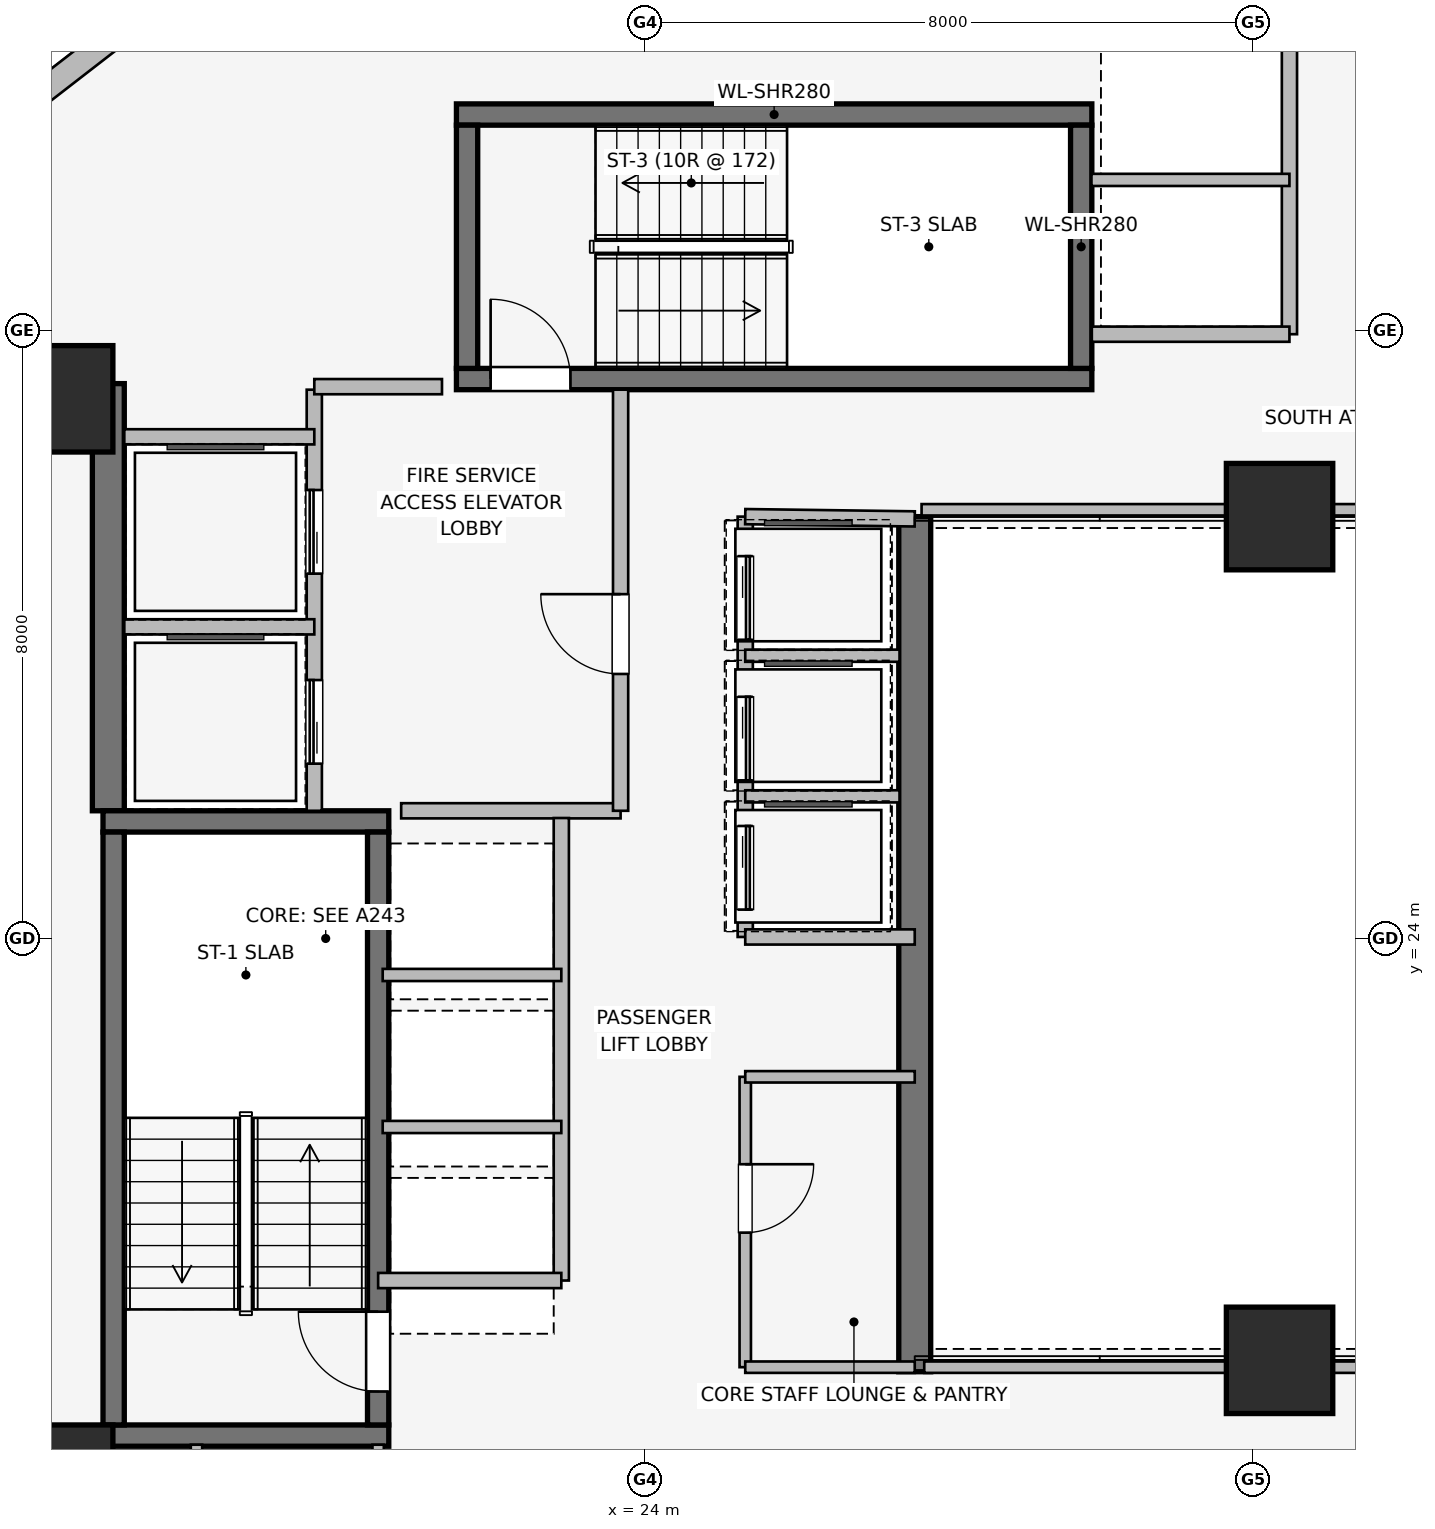
"""IFC4 building model, lengths in metres.
Left out: names, types, materials, properties, quantities, classifications, styles, units other than length and angle.
Written with IfcOpenShell. Run it as: python <this file> out.ifc"""

import sys

from ifc_helpers import new_model, si_unit, direction, frame, frame_2d, origin, origin_2d, place, context, subcontext, project, spatial, rectangle, extrude, element, fill, save


model = new_model("IFC4")
c1 = context("Model", 3, precision=1e-05, world=origin(), true_north=direction((0.0, 1.0)))
c2 = subcontext(c1, "Body", "Model", "MODEL_VIEW")
j1 = project(units=[si_unit("LENGTHUNIT", "METRE"), si_unit("PLANEANGLEUNIT", "RADIAN")], contexts=[c1])
p1 = place(None, origin())
s1 = spatial("IfcSite", under=j1, at=p1, CompositionType="ELEMENT")
p2 = place(p1, origin())
s2 = spatial("IfcBuilding", under=s1, at=p2, CompositionType="ELEMENT")
p3 = place(p2, frame((0.0, 0.0, 153.3)))
s3 = spatial("IfcBuildingStorey", under=s2, at=p3, CompositionType="ELEMENT", Elevation=153.3)
p4 = place(p3, frame((16.94, 25.68, 0.0), z_axis=(0.0, 0.0, 1.0), x_axis=(0.0, 1.0, 0.0)))
e1 = element("IfcWall", 1, at=p4, inside=s3, PredefinedType="SHEAR", context=c2, shape_type="SweptSolid", body=[
    extrude(rectangle(XDim=5.62, YDim=0.42, at=frame_2d((2.81, 0.0))), origin(), (0.0, 0.0, 1.0), 3.45),
])
p5 = place(p3, frame((27.55, 29.55, 0.0), z_axis=(0.0, 0.0, 1.0), x_axis=(0.0, -1.0, 0.0)))
e2 = element("IfcWall", 2, at=p5, inside=s3, PredefinedType="SHEAR", context=c2, shape_type="SweptSolid", body=[
    extrude(rectangle(XDim=11.25, YDim=0.42, at=frame_2d((5.625, 0.0))), origin(), (0.0, 0.0, 1.0), 3.45),
])
for number, where, z_axis, x_axis in (
    (3, (16.87, 17.46, 0.0), (0.0, 0.0, 1.0), (1.0, 0.0, 0.0)),
    (4, (20.63, 25.54, 0.0), (0.0, 0.0, 1.0), (-1.0, 0.0, 0.0)),
):
    element("IfcWall", number, at=place(p3, frame(where, z_axis=z_axis, x_axis=x_axis)), inside=s3, PredefinedType="SHEAR", context=c2, shape_type="SweptSolid", body=[
        extrude(rectangle(XDim=3.76, YDim=0.28, at=frame_2d((1.88, 0.0))), origin(), (0.0, 0.0, 1.0), 3.45),
    ])
p6 = place(p3, frame((17.01, 25.4, 0.0), z_axis=(0.0, 0.0, 1.0), x_axis=(0.0, -1.0, 0.0)))
e5 = element("IfcWall", 5, at=p6, inside=s3, PredefinedType="SHEAR", context=c2, shape_type="SweptSolid", body=[
    extrude(rectangle(XDim=7.8, YDim=0.28, at=frame_2d((3.9, 0.0))), origin(), (0.0, 0.0, 1.0), 3.45),
])
p7 = place(p3, frame((20.49, 17.6, 0.0), z_axis=(0.0, 0.0, 1.0), x_axis=(0.0, 1.0, 0.0)))
e6 = element("IfcWall", 6, at=p7, inside=s3, PredefinedType="SHEAR", context=c2, shape_type="SweptSolid", body=[
    extrude(rectangle(XDim=7.8, YDim=0.28, at=frame_2d((3.9, 0.0))), origin(), (0.0, 0.0, 1.0), 3.45),
])
p8 = place(p7, frame((0.44, 0.0, 0.0)))
e7 = element("IfcOpeningElement", 7, at=p8, cuts=e6, PredefinedType="OPENING", context=c2, shape_type="SweptSolid", body=[
    extrude(rectangle(XDim=1.05, YDim=2.0, at=frame_2d((0.525, 1.0))), frame((0.0, 0.15, 0.0), z_axis=(0.0, -1.0, 0.0), x_axis=(1.0, 0.0, 0.0)), (0.0, 0.0, 1.0), 0.3),
])
p9 = place(p3, frame((21.52, 31.36, 0.0), z_axis=(0.0, 0.0, 1.0), x_axis=(1.0, 0.0, 0.0)))
e8 = element("IfcWall", 8, at=p9, inside=s3, PredefinedType="SHEAR", context=c2, shape_type="SweptSolid", body=[
    extrude(rectangle(XDim=8.36, YDim=0.28, at=frame_2d((4.18, 0.0))), origin(), (0.0, 0.0, 1.0), 3.45),
])
p10 = place(p9, frame((0.45, 0.0, 0.0)))
e9 = element("IfcOpeningElement", 9, at=p10, cuts=e8, PredefinedType="OPENING", context=c2, shape_type="SweptSolid", body=[
    extrude(rectangle(XDim=1.05, YDim=2.0, at=frame_2d((0.525, 1.0))), frame((0.0, 0.15, 0.0), z_axis=(0.0, -1.0, 0.0), x_axis=(1.0, 0.0, 0.0)), (0.0, 0.0, 1.0), 0.3),
])
p11 = place(p3, frame((29.88, 34.84, 0.0), z_axis=(0.0, 0.0, 1.0), x_axis=(-1.0, 0.0, 0.0)))
e10 = element("IfcWall", 10, at=p11, inside=s3, PredefinedType="SHEAR", context=c2, shape_type="SweptSolid", body=[
    extrude(rectangle(XDim=8.36, YDim=0.28, at=frame_2d((4.18, 0.0))), origin(), (0.0, 0.0, 1.0), 3.45),
])
for number, where, z_axis, x_axis in (
    (11, (21.66, 34.7, 0.0), (0.0, 0.0, 1.0), (0.0, -1.0, 0.0)),
    (12, (29.74, 31.5, 0.0), (0.0, 0.0, 1.0), (0.0, 1.0, 0.0)),
):
    element("IfcWall", number, at=place(p3, frame(where, z_axis=z_axis, x_axis=x_axis)), inside=s3, PredefinedType="SHEAR", context=c2, shape_type="SweptSolid", body=[
        extrude(rectangle(XDim=3.2, YDim=0.28, at=frame_2d((1.6, 0.0))), origin(), (0.0, 0.0, 1.0), 3.45),
    ])
for number, where, z_axis, x_axis in (
    (13, (16.3, 16.9, 0.0), (0.0, 0.0, 1.0), (1.0, 0.0, 0.0)),
    (14, (16.3, 31.1, 0.0), (0.0, 0.0, 1.0), (1.0, 0.0, 0.0)),
    (15, (32.35, 18.45, 0.0), (0.0, 0.0, 1.0), (1.0, 0.0, 0.0)),
    (16, (32.35, 29.55, 0.0), (0.0, 0.0, 1.0), (1.0, 0.0, 0.0)),
):
    element("IfcColumn", number, at=place(p3, frame(where, z_axis=z_axis, x_axis=x_axis)), inside=s3, PredefinedType="COLUMN", context=c2, shape_type="SweptSolid", body=[
        extrude(rectangle(XDim=1.4, YDim=1.4, at=origin_2d()), origin(), (0.0, 0.0, 1.0), 3.45),
    ])
p12 = place(p3, frame((15.918, 35.024, 0.0), z_axis=(0.0, 0.0, 1.0), x_axis=(0.790621329885, 0.612305408053, 0.0)))
e17 = element("IfcWall", 17, at=p12, inside=s3, PredefinedType="STANDARD", context=c2, shape_type="SweptSolid", body=[
    extrude(rectangle(XDim=1.676, YDim=0.33, at=frame_2d((0.838, 0.0))), origin(), (0.0, 0.0, 1.0), 3.19),
])
p13 = place(p3, frame((19.65, 25.68, 0.0), z_axis=(0.0, 0.0, 1.0), x_axis=(0.0, 1.0, 0.0)))
e18 = element("IfcWall", 18, at=p13, inside=s3, PredefinedType="PARTITIONING", context=c2, shape_type="SweptSolid", body=[
    extrude(rectangle(XDim=5.54, YDim=0.2, at=frame_2d((2.77, 0.0))), origin(), (0.0, 0.0, 1.0), 3.19),
])
p14 = place(p13, frame((0.62, 0.0, 0.0)))
e19 = element("IfcOpeningElement", 19, at=p14, cuts=e18, PredefinedType="OPENING", context=c2, shape_type="SweptSolid", body=[
    extrude(rectangle(XDim=1.1, YDim=2.2, at=frame_2d((0.55, 1.1))), frame((0.0, 0.11, 0.0), z_axis=(0.0, -1.0, 0.0), x_axis=(1.0, 0.0, 0.0)), (0.0, 0.0, 1.0), 0.22),
])
p15 = place(p13, frame((3.12, 0.0, 0.0)))
e20 = element("IfcOpeningElement", 20, at=p15, cuts=e18, PredefinedType="OPENING", context=c2, shape_type="SweptSolid", body=[
    extrude(rectangle(XDim=1.1, YDim=2.2, at=frame_2d((0.55, 1.1))), frame((0.0, 0.11, 0.0), z_axis=(0.0, -1.0, 0.0), x_axis=(1.0, 0.0, 0.0)), (0.0, 0.0, 1.0), 0.22),
])
p16 = place(p3, frame((20.793, 25.68, 0.0), z_axis=(0.0, 0.0, 1.0), x_axis=(1.0, 0.0, 0.0)))
e21 = element("IfcWall", 21, at=p16, inside=s3, PredefinedType="PARTITIONING", context=c2, shape_type="SweptSolid", body=[
    extrude(rectangle(XDim=2.887, YDim=0.2, at=frame_2d((1.443, 0.0))), origin(), (0.0, 0.0, 1.0), 3.19),
])
p17 = place(p3, frame((23.68, 25.68, 0.0), z_axis=(0.0, 0.0, 1.0), x_axis=(0.0, 1.0, 0.0)))
e22 = element("IfcWall", 22, at=p17, inside=s3, PredefinedType="PARTITIONING", context=c2, shape_type="SweptSolid", body=[
    extrude(rectangle(XDim=5.54, YDim=0.2, at=frame_2d((2.77, 0.0))), origin(), (0.0, 0.0, 1.0), 3.19),
])
p18 = place(p17, frame((1.8, 0.0, 0.0)))
e23 = element("IfcOpeningElement", 23, at=p18, cuts=e22, PredefinedType="OPENING", context=c2, shape_type="SweptSolid", body=[
    extrude(rectangle(XDim=1.05, YDim=2.0, at=frame_2d((0.525, 1.0))), frame((0.0, 0.11, 0.0), z_axis=(0.0, -1.0, 0.0), x_axis=(1.0, 0.0, 0.0)), (0.0, 0.0, 1.0), 0.22),
])
p19 = place(p3, frame((21.33, 31.26, 0.0), z_axis=(0.0, 0.0, 1.0), x_axis=(-1.0, 0.0, 0.0)))
e24 = element("IfcWall", 24, at=p19, inside=s3, PredefinedType="PARTITIONING", context=c2, shape_type="SweptSolid", body=[
    extrude(rectangle(XDim=1.68, YDim=0.2, at=frame_2d((0.84, 0.0))), origin(), (0.0, 0.0, 1.0), 3.19),
])
p20 = place(p3, frame((17.15, 28.1, 0.0), z_axis=(0.0, 0.0, 1.0), x_axis=(1.0, 0.0, 0.0)))
e25 = element("IfcWall", 25, at=p20, inside=s3, PredefinedType="PARTITIONING", context=c2, shape_type="SweptSolid", body=[
    extrude(rectangle(XDim=2.5, YDim=0.2, at=frame_2d((1.25, 0.0))), origin(), (0.0, 0.0, 1.0), 3.19),
])
p21 = place(p3, frame((19.65, 30.6, 0.0), z_axis=(0.0, 0.0, 1.0), x_axis=(-1.0, 0.0, 0.0)))
e26 = element("IfcWall", 26, at=p21, inside=s3, PredefinedType="PARTITIONING", context=c2, shape_type="SweptSolid", body=[
    extrude(rectangle(XDim=2.5, YDim=0.2, at=frame_2d((1.25, 0.0))), origin(), (0.0, 0.0, 1.0), 2.09),
])
p22 = place(p3, frame((32.48, 31.95, 0.0), z_axis=(0.0, 0.0, 1.0), x_axis=(0.0, 1.0, 0.0)))
e27 = element("IfcWall", 27, at=p22, inside=s3, PredefinedType="PARTITIONING", context=c2, shape_type="SweptSolid", body=[
    extrude(rectangle(XDim=4.05, YDim=0.2, at=frame_2d((2.025, 0.0))), origin(), (0.0, 0.0, 1.0), 3.19),
])
p23 = place(p3, frame((32.48, 31.95, 0.0), z_axis=(0.0, 0.0, 1.0), x_axis=(-1.0, 0.0, 0.0)))
e28 = element("IfcWall", 28, at=p23, inside=s3, PredefinedType="PARTITIONING", context=c2, shape_type="SweptSolid", body=[
    extrude(rectangle(XDim=2.6, YDim=0.2, at=frame_2d((1.3, 0.0))), origin(), (0.0, 0.0, 1.0), 3.19),
])
p24 = place(p3, frame((29.875, 33.98, 0.0), z_axis=(0.0, 0.0, 1.0), x_axis=(1.0, 0.0, 0.0)))
e29 = element("IfcWall", 29, at=p24, inside=s3, PredefinedType="PARTITIONING", context=c2, shape_type="SweptSolid", body=[
    extrude(rectangle(XDim=2.605, YDim=0.16, at=frame_2d((1.302, 0.0))), origin(), (0.0, 0.0, 1.0), 3.19),
])
p25 = place(p3, frame((22.9, 19.5, 0.0), z_axis=(0.0, 0.0, 1.0), x_axis=(0.0, 1.0, 0.0)))
e30 = element("IfcWall", 30, at=p25, inside=s3, PredefinedType="PARTITIONING", context=c2, shape_type="SweptSolid", body=[
    extrude(rectangle(XDim=6.085, YDim=0.2, at=frame_2d((3.042, 0.0))), origin(), (0.0, 0.0, 1.0), 3.19),
])
p26 = place(p3, frame((20.49, 19.5, 0.0), z_axis=(0.0, 0.0, 1.0), x_axis=(1.0, 0.0, 0.0)))
e31 = element("IfcWall", 31, at=p26, inside=s3, PredefinedType="PARTITIONING", context=c2, shape_type="SweptSolid", body=[
    extrude(rectangle(XDim=2.41, YDim=0.2, at=frame_2d((1.205, 0.0))), origin(), (0.0, 0.0, 1.0), 2.09),
])
for number, where, z_axis, x_axis in (
    (32, (20.55, 21.52, 0.0), (0.0, 0.0, 1.0), (1.0, 0.0, 0.0)),
    (33, (20.55, 23.52, 0.0), (0.0, 0.0, 1.0), (1.0, 0.0, 0.0)),
):
    element("IfcWall", number, at=place(p3, frame(where, z_axis=z_axis, x_axis=x_axis)), inside=s3, PredefinedType="PARTITIONING", context=c2, shape_type="SweptSolid", body=[
        extrude(rectangle(XDim=2.35, YDim=0.16, at=frame_2d((1.175, 0.0))), origin(), (0.0, 0.0, 1.0), 3.19),
    ])
p27 = place(p3, frame((25.32, 29.55, 0.0), z_axis=(0.0, 0.0, 1.0), x_axis=(0.0, -1.0, 0.0)))
e34 = element("IfcWall", 34, at=p27, inside=s3, PredefinedType="PARTITIONING", context=c2, shape_type="SweptSolid", body=[
    extrude(rectangle(XDim=5.53, YDim=0.2, at=frame_2d((2.765, 0.0))), origin(), (0.0, 0.0, 1.0), 3.19),
])
p28 = place(p27, frame((0.52, 0.0, 0.0)))
e35 = element("IfcOpeningElement", 35, at=p28, cuts=e34, PredefinedType="OPENING", context=c2, shape_type="SweptSolid", body=[
    extrude(rectangle(XDim=1.1, YDim=2.2, at=frame_2d((0.55, 1.1))), frame((0.0, 0.11, 0.0), z_axis=(0.0, -1.0, 0.0), x_axis=(1.0, 0.0, 0.0)), (0.0, 0.0, 1.0), 0.22),
])
p29 = place(p27, frame((2.37, 0.0, 0.0)))
e36 = element("IfcOpeningElement", 36, at=p29, cuts=e34, PredefinedType="OPENING", context=c2, shape_type="SweptSolid", body=[
    extrude(rectangle(XDim=1.1, YDim=2.2, at=frame_2d((0.55, 1.1))), frame((0.0, 0.11, 0.0), z_axis=(0.0, -1.0, 0.0), x_axis=(1.0, 0.0, 0.0)), (0.0, 0.0, 1.0), 0.22),
])
p30 = place(p27, frame((4.07, 0.0, 0.0)))
e37 = element("IfcOpeningElement", 37, at=p30, cuts=e34, PredefinedType="OPENING", context=c2, shape_type="SweptSolid", body=[
    extrude(rectangle(XDim=1.1, YDim=2.2, at=frame_2d((0.55, 1.1))), frame((0.0, 0.11, 0.0), z_axis=(0.0, -1.0, 0.0), x_axis=(1.0, 0.0, 0.0)), (0.0, 0.0, 1.0), 0.22),
])
p31 = place(p3, frame((27.55, 29.52, 0.0), z_axis=(0.0, 0.0, 1.0), x_axis=(-0.999909343457, 0.013464949556, 0.0)))
e38 = element("IfcWall", 38, at=p31, inside=s3, PredefinedType="PARTITIONING", context=c2, shape_type="SweptSolid", body=[
    extrude(rectangle(XDim=2.23, YDim=0.2, at=frame_2d((1.115, 0.0))), origin(), (0.0, 0.0, 1.0), 2.09),
])
p32 = place(p3, frame((25.32, 24.02, 0.0), z_axis=(0.0, 0.0, 1.0), x_axis=(1.0, 0.0, 0.0)))
e39 = element("IfcWall", 39, at=p32, inside=s3, PredefinedType="PARTITIONING", context=c2, shape_type="SweptSolid", body=[
    extrude(rectangle(XDim=2.23, YDim=0.2, at=frame_2d((1.115, 0.0))), origin(), (0.0, 0.0, 1.0), 3.19),
])
for number, where, z_axis, x_axis in (
    (40, (25.32, 25.87, 0.0), (0.0, 0.0, 1.0), (1.0, 0.0, 0.0)),
    (41, (25.32, 27.72, 0.0), (0.0, 0.0, 1.0), (1.0, 0.0, 0.0)),
):
    element("IfcWall", number, at=place(p3, frame(where, z_axis=z_axis, x_axis=x_axis)), inside=s3, PredefinedType="PARTITIONING", context=c2, shape_type="SweptSolid", body=[
        extrude(rectangle(XDim=2.03, YDim=0.16, at=frame_2d((1.015, 0.0))), origin(), (0.0, 0.0, 1.0), 3.19),
    ])
p33 = place(p3, frame((25.32, 22.18, 0.0), z_axis=(0.0, 0.0, 1.0), x_axis=(0.0, -1.0, 0.0)))
e42 = element("IfcWall", 42, at=p33, inside=s3, PredefinedType="PARTITIONING", context=c2, shape_type="SweptSolid", body=[
    extrude(rectangle(XDim=3.82, YDim=0.15, at=frame_2d((1.91, 0.0))), origin(), (0.0, 0.0, 1.0), 3.19),
])
p34 = place(p33, frame((1.15, 0.0, 0.0)))
e43 = element("IfcOpeningElement", 43, at=p34, cuts=e42, PredefinedType="OPENING", context=c2, shape_type="SweptSolid", body=[
    extrude(rectangle(XDim=0.9, YDim=2.0, at=frame_2d((0.45, 1.0))), frame((0.0, 0.085, 0.0), z_axis=(0.0, -1.0, 0.0), x_axis=(1.0, 0.0, 0.0)), (0.0, 0.0, 1.0), 0.17),
])
for number, where, z_axis, x_axis in (
    (44, (25.32, 22.18, 0.0), (0.0, 0.0, 1.0), (1.0, 0.0, 0.0)),
    (45, (25.32, 18.36, 0.0), (0.0, 0.0, 1.0), (1.0, 0.0, 0.0)),
):
    element("IfcWall", number, at=place(p3, frame(where, z_axis=z_axis, x_axis=x_axis)), inside=s3, PredefinedType="PARTITIONING", context=c2, shape_type="SweptSolid", body=[
        extrude(rectangle(XDim=2.23, YDim=0.15, at=frame_2d((1.115, 0.0))), origin(), (0.0, 0.0, 1.0), 3.19),
    ])
p35 = place(p3, frame((18.1, 17.34, 0.0), z_axis=(0.0, 0.0, 1.0), x_axis=(0.0, -1.0, 0.0)))
e46 = element("IfcWall", 46, at=p35, inside=s3, PredefinedType="PARTITIONING", context=c2, shape_type="SweptSolid", body=[
    extrude(rectangle(XDim=4.14, YDim=0.15, at=frame_2d((2.07, 0.0))), origin(), (0.0, 0.0, 1.0), 3.19),
])
p36 = place(p3, frame((20.49, 13.2, 0.0), z_axis=(0.0, 0.0, 1.0), x_axis=(0.0, 1.0, 0.0)))
e47 = element("IfcWall", 47, at=p36, inside=s3, PredefinedType="PARTITIONING", context=c2, shape_type="SweptSolid", body=[
    extrude(rectangle(XDim=4.14, YDim=0.15, at=frame_2d((2.07, 0.0))), origin(), (0.0, 0.0, 1.0), 3.19),
])
p37 = place(p36, frame((0.45, 0.0, 0.0)))
e48 = element("IfcOpeningElement", 48, at=p37, cuts=e47, PredefinedType="OPENING", context=c2, shape_type="SweptSolid", body=[
    extrude(rectangle(XDim=0.86, YDim=2.0, at=frame_2d((0.43, 1.0))), frame((0.0, 0.085, 0.0), z_axis=(0.0, -1.0, 0.0), x_axis=(1.0, 0.0, 0.0)), (0.0, 0.0, 1.0), 0.17),
])
p38 = place(p36, frame((2.6, 0.0, 0.0)))
e49 = element("IfcOpeningElement", 49, at=p38, cuts=e47, PredefinedType="OPENING", context=c2, shape_type="SweptSolid", body=[
    extrude(rectangle(XDim=0.86, YDim=2.0, at=frame_2d((0.43, 1.0))), frame((0.0, 0.085, 0.0), z_axis=(0.0, -1.0, 0.0), x_axis=(1.0, 0.0, 0.0)), (0.0, 0.0, 1.0), 0.17),
])
p39 = place(p3, frame((27.675, 18.36, 0.0), z_axis=(0.0, 0.0, 1.0), x_axis=(1.0, 0.0, 0.0)))
e50 = element("IfcWall", 50, at=p39, inside=s3, PredefinedType="PARTITIONING", context=c2, shape_type="SweptSolid", body=[
    extrude(rectangle(XDim=12.165, YDim=0.15, at=frame_2d((6.083, 0.0))), origin(), (0.0, 0.0, 1.0), 2.331),
])
p40 = place(p3, frame((39.84, 29.64, 0.0), z_axis=(0.0, 0.0, 1.0), x_axis=(-1.0, 0.0, 0.0)))
e51 = element("IfcWall", 51, at=p40, inside=s3, PredefinedType="PARTITIONING", context=c2, shape_type="SweptSolid", body=[
    extrude(rectangle(XDim=12.2, YDim=0.15, at=frame_2d((6.1, 0.0))), origin(), (0.0, 0.0, 1.0), 2.331),
])
p41 = place(p8, origin())
e52 = element("IfcDoor", 52, at=p41, inside=s3, OperationType="SINGLE_SWING_RIGHT", PredefinedType="DOOR", context=c2, shape_type="SweptSolid", body=[
    extrude(rectangle(XDim=1.05, YDim=2.0, at=frame_2d((0.525, 1.0))), frame((0.0, 0.025, 0.0), z_axis=(0.0, -1.0, 0.0), x_axis=(1.0, 0.0, 0.0)), (0.0, 0.0, 1.0), 0.05),
])
fill(e7, e52)
p42 = place(p10, origin())
e53 = element("IfcDoor", 53, at=p42, inside=s3, OperationType="SINGLE_SWING_LEFT", PredefinedType="DOOR", context=c2, shape_type="SweptSolid", body=[
    extrude(rectangle(XDim=1.05, YDim=2.0, at=frame_2d((0.525, 1.0))), frame((0.0, 0.025, 0.0), z_axis=(0.0, -1.0, 0.0), x_axis=(1.0, 0.0, 0.0)), (0.0, 0.0, 1.0), 0.05),
])
fill(e9, e53)
p43 = place(p14, origin())
e54 = element("IfcDoor", 54, at=p43, inside=s3, OperationType="SLIDING_TO_LEFT", PredefinedType="DOOR", context=c2, shape_type="SweptSolid", body=[
    extrude(rectangle(XDim=1.1, YDim=2.2, at=frame_2d((0.55, 1.1))), frame((0.0, 0.025, 0.0), z_axis=(0.0, -1.0, 0.0), x_axis=(1.0, 0.0, 0.0)), (0.0, 0.0, 1.0), 0.05),
])
fill(e19, e54)
p44 = place(p15, origin())
e55 = element("IfcDoor", 55, at=p44, inside=s3, OperationType="SLIDING_TO_LEFT", PredefinedType="DOOR", context=c2, shape_type="SweptSolid", body=[
    extrude(rectangle(XDim=1.1, YDim=2.2, at=frame_2d((0.55, 1.1))), frame((0.0, 0.025, 0.0), z_axis=(0.0, -1.0, 0.0), x_axis=(1.0, 0.0, 0.0)), (0.0, 0.0, 1.0), 0.05),
])
fill(e20, e55)
p45 = place(p18, origin())
e56 = element("IfcDoor", 56, at=p45, inside=s3, OperationType="SINGLE_SWING_RIGHT", PredefinedType="DOOR", context=c2, shape_type="SweptSolid", body=[
    extrude(rectangle(XDim=1.05, YDim=2.0, at=frame_2d((0.525, 1.0))), frame((0.0, 0.025, 0.0), z_axis=(0.0, -1.0, 0.0), x_axis=(1.0, 0.0, 0.0)), (0.0, 0.0, 1.0), 0.05),
])
fill(e23, e56)
p46 = place(p28, origin())
e57 = element("IfcDoor", 57, at=p46, inside=s3, OperationType="SLIDING_TO_LEFT", PredefinedType="DOOR", context=c2, shape_type="SweptSolid", body=[
    extrude(rectangle(XDim=1.1, YDim=2.2, at=frame_2d((0.55, 1.1))), frame((0.0, 0.025, 0.0), z_axis=(0.0, -1.0, 0.0), x_axis=(1.0, 0.0, 0.0)), (0.0, 0.0, 1.0), 0.05),
])
fill(e35, e57)
p47 = place(p29, origin())
e58 = element("IfcDoor", 58, at=p47, inside=s3, OperationType="SLIDING_TO_LEFT", PredefinedType="DOOR", context=c2, shape_type="SweptSolid", body=[
    extrude(rectangle(XDim=1.1, YDim=2.2, at=frame_2d((0.55, 1.1))), frame((0.0, 0.025, 0.0), z_axis=(0.0, -1.0, 0.0), x_axis=(1.0, 0.0, 0.0)), (0.0, 0.0, 1.0), 0.05),
])
fill(e36, e58)
p48 = place(p30, origin())
e59 = element("IfcDoor", 59, at=p48, inside=s3, OperationType="SLIDING_TO_LEFT", PredefinedType="DOOR", context=c2, shape_type="SweptSolid", body=[
    extrude(rectangle(XDim=1.1, YDim=2.2, at=frame_2d((0.55, 1.1))), frame((0.0, 0.025, 0.0), z_axis=(0.0, -1.0, 0.0), x_axis=(1.0, 0.0, 0.0)), (0.0, 0.0, 1.0), 0.05),
])
fill(e37, e59)
p49 = place(p34, origin())
e60 = element("IfcDoor", 60, at=p49, inside=s3, OperationType="SINGLE_SWING_LEFT", PredefinedType="DOOR", context=c2, shape_type="SweptSolid", body=[
    extrude(rectangle(XDim=0.9, YDim=2.0, at=frame_2d((0.45, 1.0))), frame((0.0, 0.025, 0.0), z_axis=(0.0, -1.0, 0.0), x_axis=(1.0, 0.0, 0.0)), (0.0, 0.0, 1.0), 0.05),
])
fill(e43, e60)
save(model, sys.argv[1])
